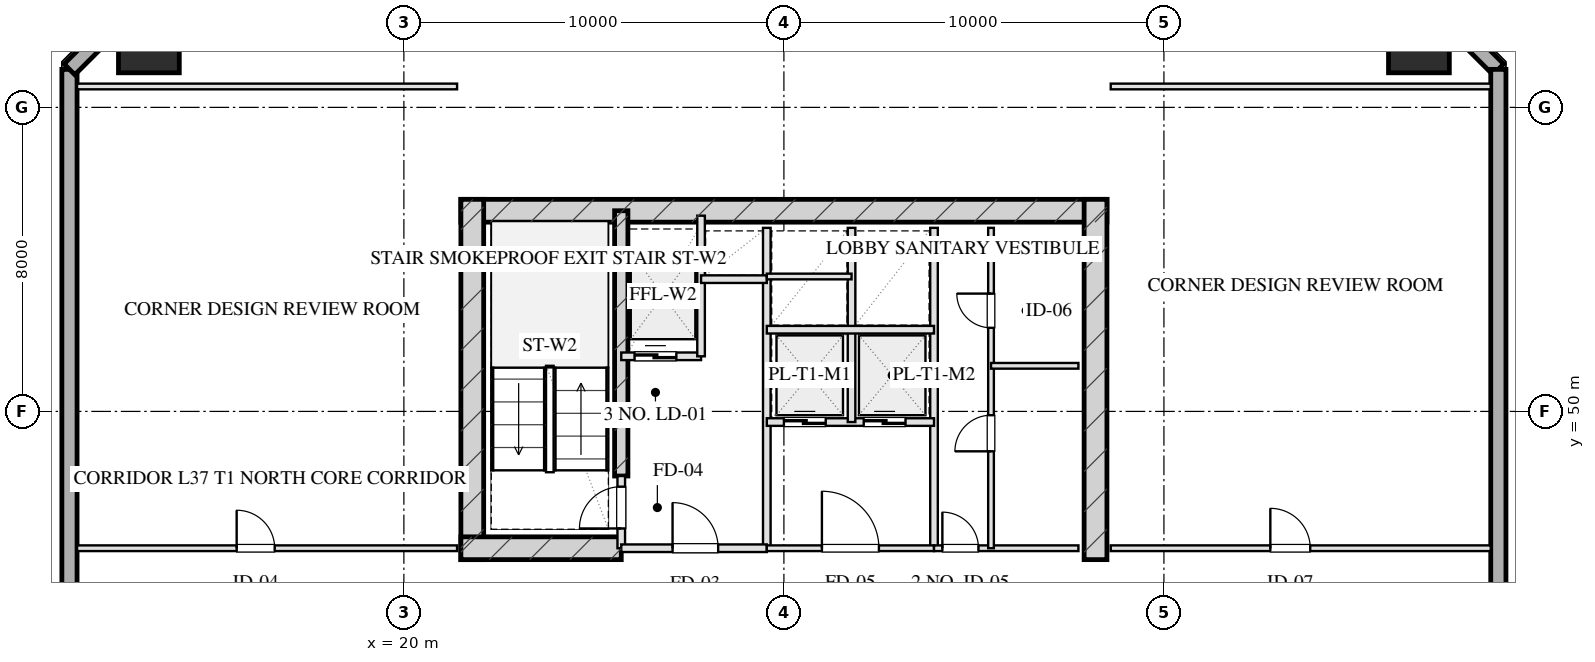
"""IFC4 building model, lengths in metres.
Left out: names, types, materials, properties, quantities, classifications, styles, units other than length and angle.
Written with IfcOpenShell. Run it as: python <this file> out.ifc"""

import sys

from ifc_helpers import new_model, si_unit, direction, frame, frame_2d, origin, origin_2d, place, context, subcontext, project, spatial, rectangle, hollow_rectangle, extrude, element, fill, save


model = new_model("IFC4")
c1 = context("Model", 3, precision=1e-05, world=origin(), true_north=direction((0.0, 1.0)))
c2 = subcontext(c1, "Body", "Model", "MODEL_VIEW")
j1 = project(units=[si_unit("LENGTHUNIT", "METRE"), si_unit("PLANEANGLEUNIT", "RADIAN")], contexts=[c1])
p1 = place(None, origin())
s1 = spatial("IfcSite", under=j1, at=p1, CompositionType="ELEMENT")
p2 = place(p1, origin())
s2 = spatial("IfcBuilding", under=s1, at=p2, CompositionType="ELEMENT")
p3 = place(p2, frame((0.0, 0.0, 142.6)))
s3 = spatial("IfcBuildingStorey", under=s2, at=p3, CompositionType="ELEMENT", Elevation=142.6)
p4 = place(p3, frame((21.5, 55.28, 0.0), z_axis=(0.0, 0.0, 1.0), x_axis=(1.0, 0.0, 0.0)))
e1 = element("IfcWall", 1, at=p4, inside=s3, PredefinedType="SHEAR", context=c2, shape_type="SweptSolid", body=[
    extrude(rectangle(XDim=17.0, YDim=0.6, at=frame_2d((8.5, 0.0))), origin(), (0.0, 0.0, 1.0), 3.45),
])
for number, where, z_axis, x_axis in (
    (2, (21.8, 46.1, 0.0), (0.0, 0.0, 1.0), (0.0, 1.0, 0.0)),
    (3, (38.2, 46.1, 0.0), (0.0, 0.0, 1.0), (0.0, 1.0, 0.0)),
):
    element("IfcWall", number, at=place(p3, frame(where, z_axis=z_axis, x_axis=x_axis)), inside=s3, PredefinedType="SHEAR", context=c2, shape_type="SweptSolid", body=[
        extrude(rectangle(XDim=9.48, YDim=0.6, at=frame_2d((4.74, 0.0))), origin(), (0.0, 0.0, 1.0), 3.45),
    ])
p5 = place(p3, frame((25.72, 48.3, 0.0), z_axis=(0.0, 0.0, 1.0), x_axis=(0.0, 1.0, 0.0)))
e4 = element("IfcWall", 4, at=p5, inside=s3, PredefinedType="SHEAR", context=c2, shape_type="SweptSolid", body=[
    extrude(rectangle(XDim=6.98, YDim=0.35, at=frame_2d((3.49, 0.0))), origin(), (0.0, 0.0, 1.0), 3.45),
])
p6 = place(p3, frame((21.5, 46.4, 0.0), z_axis=(0.0, 0.0, 1.0), x_axis=(1.0, 0.0, 0.0)))
e5 = element("IfcWall", 5, at=p6, inside=s3, PredefinedType="SHEAR", context=c2, shape_type="SweptSolid", body=[
    extrude(rectangle(XDim=4.22, YDim=0.6, at=frame_2d((2.11, 0.0))), origin(), (0.0, 0.0, 1.0), 3.45),
])
for number, where, z_axis, x_axis in (
    (6, (46.71, 59.71, 0.0), (0.0, 0.0, 1.0), (1.0, 0.0, 0.0)),
    (7, (13.29, 59.71, 0.0), (0.0, 0.0, 1.0), (1.0, 0.0, 0.0)),
):
    element("IfcColumn", number, at=place(p3, frame(where, z_axis=z_axis, x_axis=x_axis)), inside=s3, PredefinedType="COLUMN", context=c2, shape_type="SweptSolid", body=[
        extrude(hollow_rectangle(XDim=1.6, YDim=1.6, WallThickness=0.055, at=origin_2d()), origin(), (0.0, 0.0, 1.0), 3.451),
    ])
p7 = place(p3, frame((11.2, 9.0, 0.0), z_axis=(0.0, 0.0, 1.0), x_axis=(0.0, 1.0, 0.0)))
e8 = element("IfcWall", 8, at=p7, inside=s3, PredefinedType="SOLIDWALL", context=c2, shape_type="SweptSolid", body=[
    extrude(rectangle(XDim=50.0, YDim=0.4, at=frame_2d((25.0, 0.0))), origin(), (0.0, 0.0, 1.0), 2.61),
])
p8 = place(p7, frame((28.85, 0.0, 0.0)))
e9 = element("IfcOpeningElement", 9, at=p8, cuts=e8, PredefinedType="OPENING", context=c2, shape_type="SweptSolid", body=[
    extrude(rectangle(XDim=1.1, YDim=2.15, at=frame_2d((0.55, 1.075))), frame((0.0, 0.21, 0.0), z_axis=(0.0, -1.0, 0.0), x_axis=(1.0, 0.0, 0.0)), (0.0, 0.0, 1.0), 0.42),
])
for number, where, z_axis, x_axis in (
    (10, (11.2, 59.0, 0.0), (0.0, 0.0, 1.0), (0.707, 0.707, 0.0)),
    (11, (46.0, 61.8, 0.0), (0.0, 0.0, 1.0), (0.707, -0.707, 0.0)),
):
    element("IfcWall", number, at=place(p3, frame(where, z_axis=z_axis, x_axis=x_axis)), inside=s3, PredefinedType="SOLIDWALL", context=c2, shape_type="SweptSolid", body=[
        extrude(rectangle(XDim=3.96, YDim=0.4, at=frame_2d((1.98, 0.0))), origin(), (0.0, 0.0, 1.0), 2.61),
    ])
p9 = place(p3, frame((48.8, 59.0, 0.0), z_axis=(0.0, 0.0, 1.0), x_axis=(0.0, -1.0, 0.0)))
e12 = element("IfcWall", 12, at=p9, inside=s3, PredefinedType="SOLIDWALL", context=c2, shape_type="SweptSolid", body=[
    extrude(rectangle(XDim=50.0, YDim=0.4, at=frame_2d((25.0, 0.0))), origin(), (0.0, 0.0, 1.0), 2.61),
])
p10 = place(p9, frame((30.275, 0.0, 0.75)))
e13 = element("IfcOpeningElement", 13, at=p10, cuts=e12, PredefinedType="OPENING", context=c2, shape_type="SweptSolid", body=[
    extrude(rectangle(XDim=2.25, YDim=1.46, at=frame_2d((1.125, 0.73))), frame((0.0, 0.21, 0.0), z_axis=(0.0, -1.0, 0.0), x_axis=(1.0, 0.0, 0.0)), (0.0, 0.0, 1.0), 0.42),
])
p11 = place(p9, frame((18.65, 0.0, 0.0)))
e14 = element("IfcOpeningElement", 14, at=p11, cuts=e12, PredefinedType="OPENING", context=c2, shape_type="SweptSolid", body=[
    extrude(rectangle(XDim=1.1, YDim=2.15, at=frame_2d((0.55, 1.075))), frame((0.0, 0.21, 0.0), z_axis=(0.0, -1.0, 0.0), x_axis=(1.0, 0.0, 0.0)), (0.0, 0.0, 1.0), 0.42),
])
p12 = place(p3, frame((25.72, 46.4, 0.0), z_axis=(0.0, 0.0, 1.0), x_axis=(0.0, 1.0, 0.0)))
e15 = element("IfcWall", 15, at=p12, inside=s3, PredefinedType="PARTITIONING", context=c2, shape_type="SweptSolid", body=[
    extrude(rectangle(XDim=1.9, YDim=0.2, at=frame_2d((0.95, 0.0))), origin(), (0.0, 0.0, 1.0), 3.175),
])
p13 = place(p12, frame((0.52, 0.0, 0.0)))
e16 = element("IfcOpeningElement", 16, at=p13, cuts=e15, PredefinedType="OPENING", context=c2, shape_type="SweptSolid", body=[
    extrude(rectangle(XDim=1.1, YDim=2.05, at=frame_2d((0.55, 1.025))), frame((0.0, 0.11, 0.0), z_axis=(0.0, -1.0, 0.0), x_axis=(1.0, 0.0, 0.0)), (0.0, 0.0, 1.0), 0.22),
])
p14 = place(p3, frame((29.55, 46.4, 0.0), z_axis=(0.0, 0.0, 1.0), x_axis=(0.0, 1.0, 0.0)))
e17 = element("IfcWall", 17, at=p14, inside=s3, PredefinedType="PARTITIONING", context=c2, shape_type="SweptSolid", body=[
    extrude(rectangle(XDim=8.43, YDim=0.2, at=frame_2d((4.215, 0.0))), origin(), (0.0, 0.0, 1.0), 3.175),
])
p15 = place(p3, frame((25.72, 46.4, 0.0), z_axis=(0.0, 0.0, 1.0), x_axis=(1.0, 0.0, 0.0)))
e18 = element("IfcWall", 18, at=p15, inside=s3, PredefinedType="PARTITIONING", context=c2, shape_type="SweptSolid", body=[
    extrude(rectangle(XDim=3.83, YDim=0.2, at=frame_2d((1.915, 0.0))), origin(), (0.0, 0.0, 1.0), 3.175),
])
p16 = place(p15, frame((1.35, 0.0, 0.0)))
e19 = element("IfcOpeningElement", 19, at=p16, cuts=e18, PredefinedType="OPENING", context=c2, shape_type="SweptSolid", body=[
    extrude(rectangle(XDim=1.2, YDim=2.05, at=frame_2d((0.6, 1.025))), frame((0.0, 0.11, 0.0), z_axis=(0.0, -1.0, 0.0), x_axis=(1.0, 0.0, 0.0)), (0.0, 0.0, 1.0), 0.22),
])
p17 = place(p3, frame((25.72, 51.45, 0.0), z_axis=(0.0, 0.0, 1.0), x_axis=(1.0, 0.0, 0.0)))
e20 = element("IfcWall", 20, at=p17, inside=s3, PredefinedType="PARTITIONING", context=c2, shape_type="SweptSolid", body=[
    extrude(rectangle(XDim=2.1, YDim=0.2, at=frame_2d((1.05, 0.0))), origin(), (0.0, 0.0, 1.0), 3.175),
])
p18 = place(p17, frame((0.35, 0.0, 0.0)))
e21 = element("IfcOpeningElement", 21, at=p18, cuts=e20, PredefinedType="OPENING", context=c2, shape_type="SweptSolid", body=[
    extrude(rectangle(XDim=1.1, YDim=2.05, at=frame_2d((0.55, 1.025))), frame((0.0, 0.11, 0.0), z_axis=(0.0, -1.0, 0.0), x_axis=(1.0, 0.0, 0.0)), (0.0, 0.0, 1.0), 0.22),
])
p19 = place(p3, frame((27.82, 51.45, 0.0), z_axis=(0.0, 0.0, 1.0), x_axis=(0.0, 1.0, 0.0)))
e22 = element("IfcWall", 22, at=p19, inside=s3, PredefinedType="PARTITIONING", context=c2, shape_type="SweptSolid", body=[
    extrude(rectangle(XDim=3.7, YDim=0.2, at=frame_2d((1.85, 0.0))), origin(), (0.0, 0.0, 1.0), 3.175),
])
p20 = place(p3, frame((27.82, 53.48, 0.0), z_axis=(0.0, 0.0, 1.0), x_axis=(1.0, 0.0, 0.0)))
e23 = element("IfcWall", 23, at=p20, inside=s3, PredefinedType="PARTITIONING", context=c2, shape_type="SweptSolid", body=[
    extrude(rectangle(XDim=1.73, YDim=0.2, at=frame_2d((0.865, 0.0))), origin(), (0.0, 0.0, 1.0), 3.175),
])
p21 = place(p3, frame((33.95, 46.4, 0.0), z_axis=(0.0, 0.0, 1.0), x_axis=(0.0, 1.0, 0.0)))
e24 = element("IfcWall", 24, at=p21, inside=s3, PredefinedType="PARTITIONING", context=c2, shape_type="SweptSolid", body=[
    extrude(rectangle(XDim=8.43, YDim=0.2, at=frame_2d((4.215, 0.0))), origin(), (0.0, 0.0, 1.0), 3.175),
])
p22 = place(p3, frame((29.55, 46.4, 0.0), z_axis=(0.0, 0.0, 1.0), x_axis=(1.0, 0.0, 0.0)))
e25 = element("IfcWall", 25, at=p22, inside=s3, PredefinedType="PARTITIONING", context=c2, shape_type="SweptSolid", body=[
    extrude(rectangle(XDim=4.4, YDim=0.15, at=frame_2d((2.2, 0.0))), origin(), (0.0, 0.0, 1.0), 3.175),
])
p23 = place(p22, frame((1.45, 0.0, 0.0)))
e26 = element("IfcOpeningElement", 26, at=p23, cuts=e25, PredefinedType="OPENING", context=c2, shape_type="SweptSolid", body=[
    extrude(rectangle(XDim=1.5, YDim=2.05, at=frame_2d((0.75, 1.025))), frame((0.0, 0.085, 0.0), z_axis=(0.0, -1.0, 0.0), x_axis=(1.0, 0.0, 0.0)), (0.0, 0.0, 1.0), 0.17),
])
p24 = place(p3, frame((29.55, 49.72, 0.0), z_axis=(0.0, 0.0, 1.0), x_axis=(1.0, 0.0, 0.0)))
e27 = element("IfcWall", 27, at=p24, inside=s3, PredefinedType="PARTITIONING", context=c2, shape_type="SweptSolid", body=[
    extrude(rectangle(XDim=4.4, YDim=0.2, at=frame_2d((2.2, 0.0))), origin(), (0.0, 0.0, 1.0), 3.175),
])
p25 = place(p24, frame((0.45, 0.0, 0.0)))
e28 = element("IfcOpeningElement", 28, at=p25, cuts=e27, PredefinedType="OPENING", context=c2, shape_type="SweptSolid", body=[
    extrude(rectangle(XDim=1.1, YDim=2.05, at=frame_2d((0.55, 1.025))), frame((0.0, 0.11, 0.0), z_axis=(0.0, -1.0, 0.0), x_axis=(1.0, 0.0, 0.0)), (0.0, 0.0, 1.0), 0.22),
])
p26 = place(p24, frame((2.55, 0.0, 0.0)))
e29 = element("IfcOpeningElement", 29, at=p26, cuts=e27, PredefinedType="OPENING", context=c2, shape_type="SweptSolid", body=[
    extrude(rectangle(XDim=1.1, YDim=2.05, at=frame_2d((0.55, 1.025))), frame((0.0, 0.11, 0.0), z_axis=(0.0, -1.0, 0.0), x_axis=(1.0, 0.0, 0.0)), (0.0, 0.0, 1.0), 0.22),
])
p27 = place(p3, frame((31.78, 49.72, 0.0), z_axis=(0.0, 0.0, 1.0), x_axis=(0.0, 1.0, 0.0)))
e30 = element("IfcWall", 30, at=p27, inside=s3, PredefinedType="PARTITIONING", context=c2, shape_type="SweptSolid", body=[
    extrude(rectangle(XDim=5.11, YDim=0.2, at=frame_2d((2.555, 0.0))), origin(), (0.0, 0.0, 1.0), 3.175),
])
p28 = place(p3, frame((29.55, 52.15, 0.0), z_axis=(0.0, 0.0, 1.0), x_axis=(1.0, 0.0, 0.0)))
e31 = element("IfcWall", 31, at=p28, inside=s3, PredefinedType="PARTITIONING", context=c2, shape_type="SweptSolid", body=[
    extrude(rectangle(XDim=4.4, YDim=0.2, at=frame_2d((2.2, 0.0))), origin(), (0.0, 0.0, 1.0), 3.175),
])
p29 = place(p3, frame((29.55, 53.55, 0.0), z_axis=(0.0, 0.0, 1.0), x_axis=(1.0, 0.0, 0.0)))
e32 = element("IfcWall", 32, at=p29, inside=s3, PredefinedType="PARTITIONING", context=c2, shape_type="SweptSolid", body=[
    extrude(rectangle(XDim=2.23, YDim=0.15, at=frame_2d((1.115, 0.0))), origin(), (0.0, 0.0, 1.0), 3.175),
])
p30 = place(p3, frame((33.95, 46.4, 0.0), z_axis=(0.0, 0.0, 1.0), x_axis=(1.0, 0.0, 0.0)))
e33 = element("IfcWall", 33, at=p30, inside=s3, PredefinedType="PARTITIONING", context=c2, shape_type="SweptSolid", body=[
    extrude(rectangle(XDim=3.8, YDim=0.15, at=frame_2d((1.9, 0.0))), origin(), (0.0, 0.0, 1.0), 3.175),
])
p31 = place(p30, frame((0.22, 0.0, 0.0)))
e34 = element("IfcOpeningElement", 34, at=p31, cuts=e33, PredefinedType="OPENING", context=c2, shape_type="SweptSolid", body=[
    extrude(rectangle(XDim=0.95, YDim=2.05, at=frame_2d((0.475, 1.025))), frame((0.0, 0.085, 0.0), z_axis=(0.0, -1.0, 0.0), x_axis=(1.0, 0.0, 0.0)), (0.0, 0.0, 1.0), 0.17),
])
p32 = place(p3, frame((35.45, 46.4, 0.0), z_axis=(0.0, 0.0, 1.0), x_axis=(0.0, 1.0, 0.0)))
e35 = element("IfcWall", 35, at=p32, inside=s3, PredefinedType="PARTITIONING", context=c2, shape_type="SweptSolid", body=[
    extrude(rectangle(XDim=8.43, YDim=0.15, at=frame_2d((4.215, 0.0))), origin(), (0.0, 0.0, 1.0), 2.815),
])
p33 = place(p32, frame((2.55, 0.0, 0.0)))
e36 = element("IfcOpeningElement", 36, at=p33, cuts=e35, PredefinedType="OPENING", context=c2, shape_type="SweptSolid", body=[
    extrude(rectangle(XDim=0.95, YDim=2.05, at=frame_2d((0.475, 1.025))), frame((0.0, 0.085, 0.0), z_axis=(0.0, -1.0, 0.0), x_axis=(1.0, 0.0, 0.0)), (0.0, 0.0, 1.0), 0.17),
])
p34 = place(p32, frame((5.8, 0.0, 0.0)))
e37 = element("IfcOpeningElement", 37, at=p34, cuts=e35, PredefinedType="OPENING", context=c2, shape_type="SweptSolid", body=[
    extrude(rectangle(XDim=0.9, YDim=2.05, at=frame_2d((0.45, 1.025))), frame((0.0, 0.085, 0.0), z_axis=(0.0, -1.0, 0.0), x_axis=(1.0, 0.0, 0.0)), (0.0, 0.0, 1.0), 0.17),
])
p35 = place(p3, frame((35.45, 51.2, 0.0), z_axis=(0.0, 0.0, 1.0), x_axis=(1.0, 0.0, 0.0)))
e38 = element("IfcWall", 38, at=p35, inside=s3, PredefinedType="PARTITIONING", context=c2, shape_type="SweptSolid", body=[
    extrude(rectangle(XDim=2.3, YDim=0.15, at=frame_2d((1.15, 0.0))), origin(), (0.0, 0.0, 1.0), 3.175),
])
p36 = place(p3, frame((11.4, 58.55, 0.0), z_axis=(0.0, 0.0, 1.0), x_axis=(1.0, 0.0, 0.0)))
e39 = element("IfcWall", 39, at=p36, inside=s3, PredefinedType="PARTITIONING", context=c2, shape_type="SweptSolid", body=[
    extrude(rectangle(XDim=10.0, YDim=0.15, at=frame_2d((5.0, 0.0))), origin(), (0.0, 0.0, 1.0), 3.175),
])
p37 = place(p3, frame((11.4, 46.4, 0.0), z_axis=(0.0, 0.0, 1.0), x_axis=(1.0, 0.0, 0.0)))
e40 = element("IfcWall", 40, at=p37, inside=s3, PredefinedType="PARTITIONING", context=c2, shape_type="SweptSolid", body=[
    extrude(rectangle(XDim=10.0, YDim=0.15, at=frame_2d((5.0, 0.0))), origin(), (0.0, 0.0, 1.0), 3.175),
])
p38 = place(p37, frame((4.2, 0.0, 0.0)))
e41 = element("IfcOpeningElement", 41, at=p38, cuts=e40, PredefinedType="OPENING", context=c2, shape_type="SweptSolid", body=[
    extrude(rectangle(XDim=1.0, YDim=2.05, at=frame_2d((0.5, 1.025))), frame((0.0, 0.085, 0.0), z_axis=(0.0, -1.0, 0.0), x_axis=(1.0, 0.0, 0.0)), (0.0, 0.0, 1.0), 0.17),
])
p39 = place(p3, frame((38.6, 58.55, 0.0), z_axis=(0.0, 0.0, 1.0), x_axis=(1.0, 0.0, 0.0)))
e42 = element("IfcWall", 42, at=p39, inside=s3, PredefinedType="PARTITIONING", context=c2, shape_type="SweptSolid", body=[
    extrude(rectangle(XDim=10.0, YDim=0.15, at=frame_2d((5.0, 0.0))), origin(), (0.0, 0.0, 1.0), 3.175),
])
p40 = place(p3, frame((38.6, 46.4, 0.0), z_axis=(0.0, 0.0, 1.0), x_axis=(1.0, 0.0, 0.0)))
e43 = element("IfcWall", 43, at=p40, inside=s3, PredefinedType="PARTITIONING", context=c2, shape_type="SweptSolid", body=[
    extrude(rectangle(XDim=10.0, YDim=0.15, at=frame_2d((5.0, 0.0))), origin(), (0.0, 0.0, 1.0), 3.175),
])
p41 = place(p40, frame((4.2, 0.0, 0.0)))
e44 = element("IfcOpeningElement", 44, at=p41, cuts=e43, PredefinedType="OPENING", context=c2, shape_type="SweptSolid", body=[
    extrude(rectangle(XDim=1.05, YDim=2.05, at=frame_2d((0.525, 1.025))), frame((0.0, 0.085, 0.0), z_axis=(0.0, -1.0, 0.0), x_axis=(1.0, 0.0, 0.0)), (0.0, 0.0, 1.0), 0.17),
])
p42 = place(p13, origin())
e45 = element("IfcDoor", 45, at=p42, inside=s3, OperationType="SINGLE_SWING_LEFT", PredefinedType="DOOR", context=c2, shape_type="SweptSolid", body=[
    extrude(rectangle(XDim=1.1, YDim=2.05, at=frame_2d((0.55, 1.025))), frame((0.0, 0.025, 0.0), z_axis=(0.0, -1.0, 0.0), x_axis=(1.0, 0.0, 0.0)), (0.0, 0.0, 1.0), 0.05),
])
fill(e16, e45)
p43 = place(p16, origin())
e46 = element("IfcDoor", 46, at=p43, inside=s3, OperationType="SINGLE_SWING_LEFT", PredefinedType="DOOR", context=c2, shape_type="SweptSolid", body=[
    extrude(rectangle(XDim=1.2, YDim=2.05, at=frame_2d((0.6, 1.025))), frame((0.0, 0.025, 0.0), z_axis=(0.0, -1.0, 0.0), x_axis=(1.0, 0.0, 0.0)), (0.0, 0.0, 1.0), 0.05),
])
fill(e19, e46)
p44 = place(p18, origin())
e47 = element("IfcDoor", 47, at=p44, inside=s3, OperationType="DOUBLE_DOOR_SLIDING", PredefinedType="DOOR", context=c2, shape_type="SweptSolid", body=[
    extrude(rectangle(XDim=1.1, YDim=2.05, at=frame_2d((0.55, 1.025))), frame((0.0, 0.025, 0.0), z_axis=(0.0, -1.0, 0.0), x_axis=(1.0, 0.0, 0.0)), (0.0, 0.0, 1.0), 0.05),
])
fill(e21, e47)
p45 = place(p23, origin())
e48 = element("IfcDoor", 48, at=p45, inside=s3, OperationType="SINGLE_SWING_LEFT", PredefinedType="DOOR", context=c2, shape_type="SweptSolid", body=[
    extrude(rectangle(XDim=1.5, YDim=2.05, at=frame_2d((0.75, 1.025))), frame((0.0, 0.025, 0.0), z_axis=(0.0, -1.0, 0.0), x_axis=(1.0, 0.0, 0.0)), (0.0, 0.0, 1.0), 0.05),
])
fill(e26, e48)
p46 = place(p25, origin())
e49 = element("IfcDoor", 49, at=p46, inside=s3, OperationType="DOUBLE_DOOR_SLIDING", PredefinedType="DOOR", context=c2, shape_type="SweptSolid", body=[
    extrude(rectangle(XDim=1.1, YDim=2.05, at=frame_2d((0.55, 1.025))), frame((0.0, 0.025, 0.0), z_axis=(0.0, -1.0, 0.0), x_axis=(1.0, 0.0, 0.0)), (0.0, 0.0, 1.0), 0.05),
])
fill(e28, e49)
p47 = place(p26, origin())
e50 = element("IfcDoor", 50, at=p47, inside=s3, OperationType="DOUBLE_DOOR_SLIDING", PredefinedType="DOOR", context=c2, shape_type="SweptSolid", body=[
    extrude(rectangle(XDim=1.1, YDim=2.05, at=frame_2d((0.55, 1.025))), frame((0.0, 0.025, 0.0), z_axis=(0.0, -1.0, 0.0), x_axis=(1.0, 0.0, 0.0)), (0.0, 0.0, 1.0), 0.05),
])
fill(e29, e50)
p48 = place(p31, origin())
e51 = element("IfcDoor", 51, at=p48, inside=s3, OperationType="SINGLE_SWING_LEFT", PredefinedType="DOOR", context=c2, shape_type="SweptSolid", body=[
    extrude(rectangle(XDim=0.95, YDim=2.05, at=frame_2d((0.475, 1.025))), frame((0.0, 0.025, 0.0), z_axis=(0.0, -1.0, 0.0), x_axis=(1.0, 0.0, 0.0)), (0.0, 0.0, 1.0), 0.05),
])
fill(e34, e51)
p49 = place(p33, origin())
e52 = element("IfcDoor", 52, at=p49, inside=s3, OperationType="SINGLE_SWING_LEFT", PredefinedType="DOOR", context=c2, shape_type="SweptSolid", body=[
    extrude(rectangle(XDim=0.95, YDim=2.05, at=frame_2d((0.475, 1.025))), frame((0.0, 0.025, 0.0), z_axis=(0.0, -1.0, 0.0), x_axis=(1.0, 0.0, 0.0)), (0.0, 0.0, 1.0), 0.05),
])
fill(e36, e52)
p50 = place(p34, origin())
e53 = element("IfcDoor", 53, at=p50, inside=s3, OperationType="SINGLE_SWING_RIGHT", PredefinedType="DOOR", context=c2, shape_type="SweptSolid", body=[
    extrude(rectangle(XDim=0.9, YDim=2.05, at=frame_2d((0.45, 1.025))), frame((0.0, 0.025, 0.0), z_axis=(0.0, -1.0, 0.0), x_axis=(1.0, 0.0, 0.0)), (0.0, 0.0, 1.0), 0.05),
])
fill(e37, e53)
p51 = place(p38, origin())
e54 = element("IfcDoor", 54, at=p51, inside=s3, OperationType="SINGLE_SWING_LEFT", PredefinedType="DOOR", context=c2, shape_type="SweptSolid", body=[
    extrude(rectangle(XDim=1.0, YDim=2.05, at=frame_2d((0.5, 1.025))), frame((0.0, 0.025, 0.0), z_axis=(0.0, -1.0, 0.0), x_axis=(1.0, 0.0, 0.0)), (0.0, 0.0, 1.0), 0.05),
])
fill(e41, e54)
p52 = place(p41, origin())
e55 = element("IfcDoor", 55, at=p52, inside=s3, OperationType="SINGLE_SWING_LEFT", PredefinedType="DOOR", context=c2, shape_type="SweptSolid", body=[
    extrude(rectangle(XDim=1.05, YDim=2.05, at=frame_2d((0.525, 1.025))), frame((0.0, 0.025, 0.0), z_axis=(0.0, -1.0, 0.0), x_axis=(1.0, 0.0, 0.0)), (0.0, 0.0, 1.0), 0.05),
])
fill(e44, e55)
save(model, sys.argv[1])
